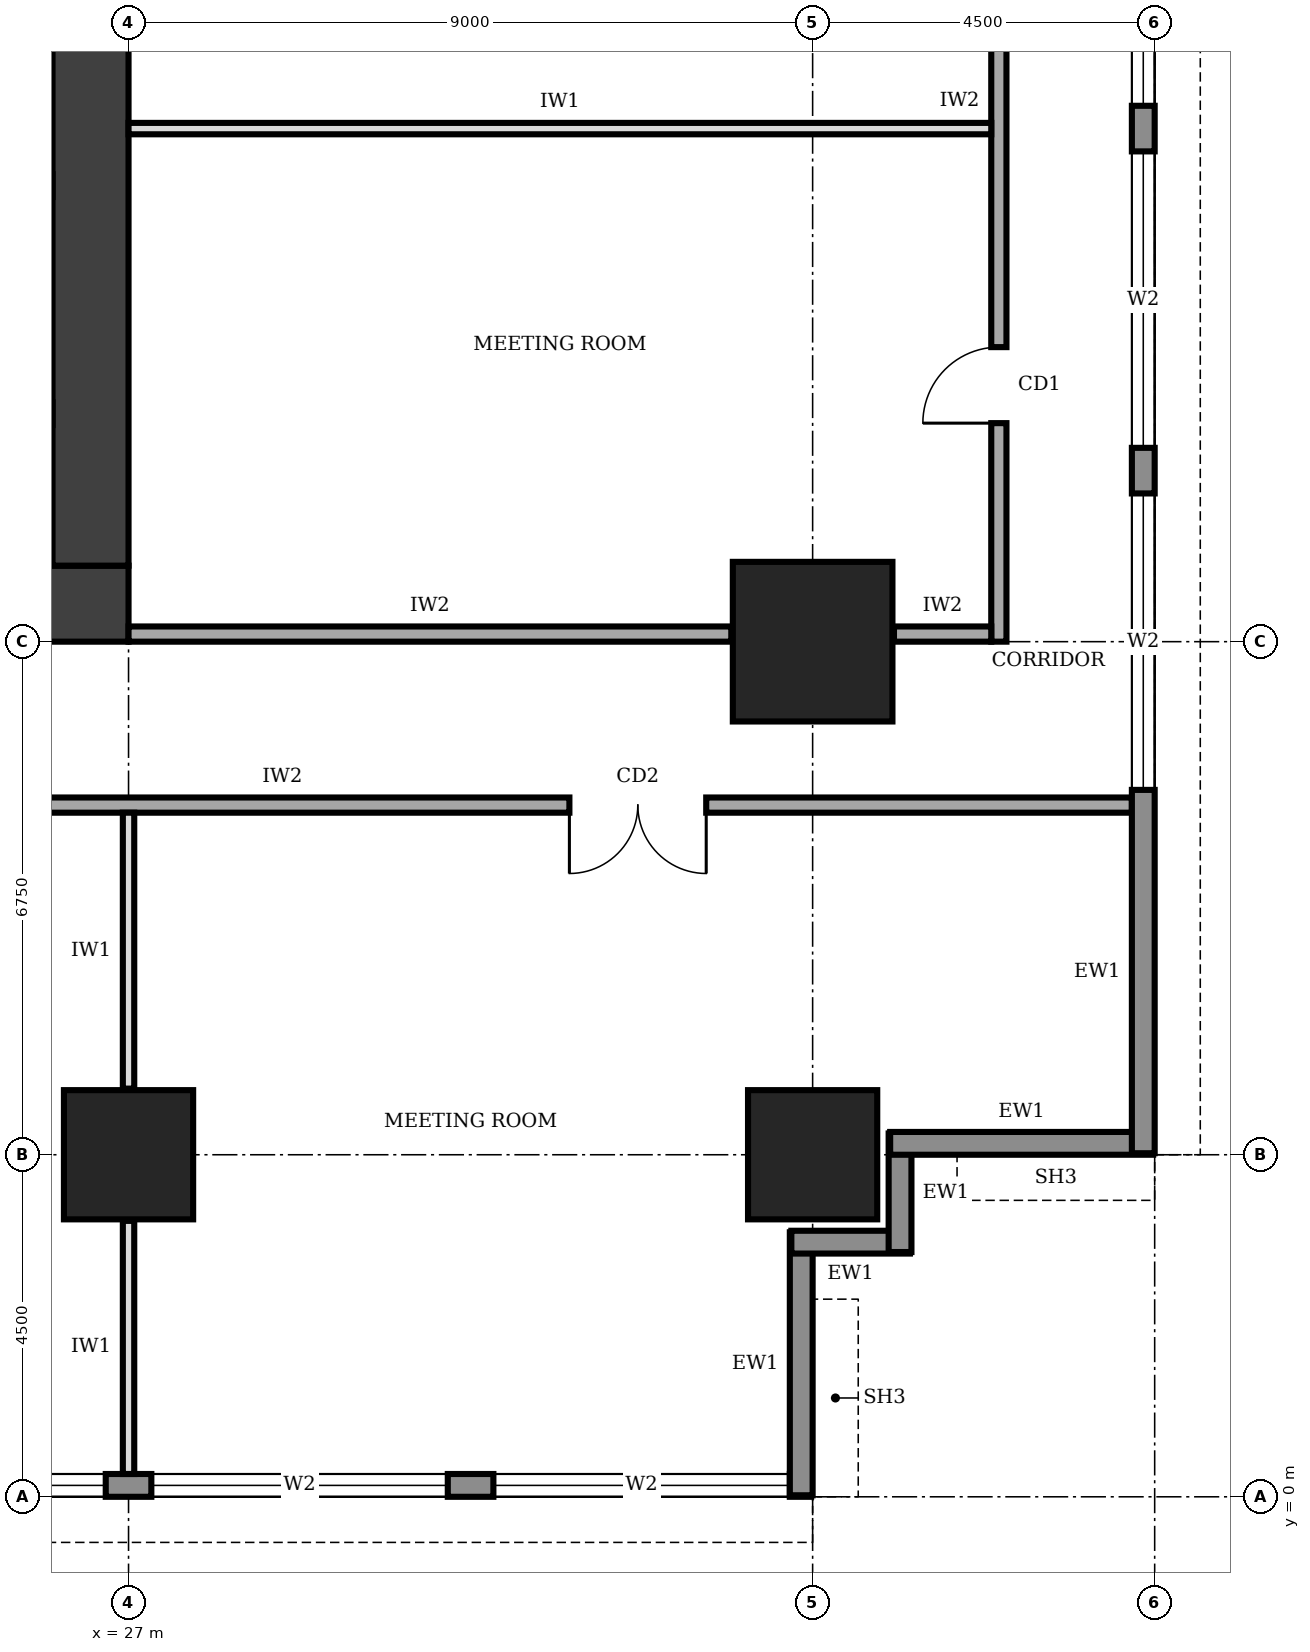
"""IFC4 building model, lengths in metres.
Left out: names, types, materials, properties, quantities, classifications, styles, units other than length and angle.
Written with IfcOpenShell. Run it as: python <this file> out.ifc"""

import sys

from ifc_helpers import new_model, si_unit, direction, frame, frame_2d, origin, origin_2d, place, context, subcontext, project, spatial, rectangle, extrude, element, fill, save


model = new_model("IFC4")
c1 = context("Model", 3, precision=1e-05, world=origin(), true_north=direction((0.0, 1.0)))
c2 = subcontext(c1, "Body", "Model", "MODEL_VIEW")
j1 = project(units=[si_unit("LENGTHUNIT", "METRE"), si_unit("PLANEANGLEUNIT", "RADIAN")], contexts=[c1])
p1 = place(None, origin())
s1 = spatial("IfcSite", under=j1, at=p1, CompositionType="ELEMENT")
p2 = place(p1, origin())
s2 = spatial("IfcBuilding", under=s1, at=p2, CompositionType="ELEMENT")
p3 = place(p2, frame((0.0, 0.0, 145.0)))
s3 = spatial("IfcBuildingStorey", under=s2, at=p3, CompositionType="ELEMENT", Elevation=145.0)
p4 = place(p3, frame((13.5, 11.75, 0.0), z_axis=(0.0, 0.0, 1.0), x_axis=(1.0, 0.0, 0.0)))
e1 = element("IfcWall", 1, at=p4, inside=s3, PredefinedType="SHEAR", context=c2, shape_type="SweptSolid", body=[
    extrude(rectangle(XDim=13.5, YDim=1.0, at=frame_2d((6.75, 0.0))), origin(), (0.0, 0.0, 1.0), 4.0),
])
p5 = place(p4, frame((4.75, 0.0, 0.0)))
e2 = element("IfcOpeningElement", 2, at=p5, cuts=e1, PredefinedType="OPENING", context=c2, shape_type="SweptSolid", body=[
    extrude(rectangle(XDim=1.0, YDim=2.1, at=frame_2d((0.5, 1.05))), frame((0.0, 0.51, 0.0), z_axis=(0.0, -1.0, 0.0), x_axis=(1.0, 0.0, 0.0)), (0.0, 0.0, 1.0), 1.02),
])
p6 = place(p3, frame((26.5, 12.25, 0.0), z_axis=(0.0, 0.0, 1.0), x_axis=(0.0, 1.0, 0.0)))
e3 = element("IfcWall", 3, at=p6, inside=s3, PredefinedType="SHEAR", context=c2, shape_type="SweptSolid", body=[
    extrude(rectangle(XDim=16.0, YDim=1.0, at=frame_2d((8.0, 0.0))), origin(), (0.0, 0.0, 1.0), 4.0),
])
for number, where, z_axis, x_axis in (
    (4, (27.0, 4.5, 0.0), (0.0, 0.0, 1.0), (1.0, 0.0, 0.0)),
    (5, (36.0, 4.5, 0.0), (0.0, 0.0, 1.0), (1.0, 0.0, 0.0)),
):
    element("IfcColumn", number, at=place(p3, frame(where, z_axis=z_axis, x_axis=x_axis)), inside=s3, PredefinedType="COLUMN", context=c2, shape_type="SweptSolid", body=[
        extrude(rectangle(XDim=1.7, YDim=1.7, at=origin_2d()), origin(), (0.0, 0.0, 1.0), 4.0),
    ])
p7 = place(p3, frame((36.0, 11.25, 0.0), z_axis=(0.0, 0.0, 1.0), x_axis=(1.0, 0.0, 0.0)))
e6 = element("IfcColumn", 6, at=p7, inside=s3, PredefinedType="COLUMN", context=c2, shape_type="SweptSolid", body=[
    extrude(rectangle(XDim=2.1, YDim=2.1, at=origin_2d()), origin(), (0.0, 0.0, 1.0), 4.0),
])
p8 = place(p3, frame((4.52, 0.15, 0.0), z_axis=(0.0, 0.0, 1.0), x_axis=(1.0, 0.0, 0.0)))
e7 = element("IfcWall", 7, at=p8, inside=s3, PredefinedType="STANDARD", context=c2, shape_type="SweptSolid", body=[
    extrude(rectangle(XDim=31.46, YDim=0.3, at=frame_2d((15.73, 0.0))), origin(), (0.0, 0.0, 1.0), 3.75),
])
p9 = place(p8, frame((4.78, 0.0, 0.6)))
e8 = element("IfcOpeningElement", 8, at=p9, cuts=e7, PredefinedType="OPENING", context=c2, shape_type="SweptSolid", body=[
    extrude(rectangle(XDim=3.9, YDim=2.6, at=frame_2d((1.95, 1.3))), frame((0.0, 0.16, 0.0), z_axis=(0.0, -1.0, 0.0), x_axis=(1.0, 0.0, 0.0)), (0.0, 0.0, 1.0), 0.32),
])
p10 = place(p8, frame((9.28, 0.0, 0.6)))
e9 = element("IfcOpeningElement", 9, at=p10, cuts=e7, PredefinedType="OPENING", context=c2, shape_type="SweptSolid", body=[
    extrude(rectangle(XDim=3.9, YDim=2.6, at=frame_2d((1.95, 1.3))), frame((0.0, 0.16, 0.0), z_axis=(0.0, -1.0, 0.0), x_axis=(1.0, 0.0, 0.0)), (0.0, 0.0, 1.0), 0.32),
])
p11 = place(p8, frame((13.78, 0.0, 0.6)))
e10 = element("IfcOpeningElement", 10, at=p11, cuts=e7, PredefinedType="OPENING", context=c2, shape_type="SweptSolid", body=[
    extrude(rectangle(XDim=3.9, YDim=2.6, at=frame_2d((1.95, 1.3))), frame((0.0, 0.16, 0.0), z_axis=(0.0, -1.0, 0.0), x_axis=(1.0, 0.0, 0.0)), (0.0, 0.0, 1.0), 0.32),
])
p12 = place(p8, frame((18.28, 0.0, 0.6)))
e11 = element("IfcOpeningElement", 11, at=p12, cuts=e7, PredefinedType="OPENING", context=c2, shape_type="SweptSolid", body=[
    extrude(rectangle(XDim=3.9, YDim=2.6, at=frame_2d((1.95, 1.3))), frame((0.0, 0.16, 0.0), z_axis=(0.0, -1.0, 0.0), x_axis=(1.0, 0.0, 0.0)), (0.0, 0.0, 1.0), 0.32),
])
p13 = place(p8, frame((22.78, 0.0, 0.6)))
e12 = element("IfcOpeningElement", 12, at=p13, cuts=e7, PredefinedType="OPENING", context=c2, shape_type="SweptSolid", body=[
    extrude(rectangle(XDim=3.9, YDim=2.6, at=frame_2d((1.95, 1.3))), frame((0.0, 0.16, 0.0), z_axis=(0.0, -1.0, 0.0), x_axis=(1.0, 0.0, 0.0)), (0.0, 0.0, 1.0), 0.32),
])
p14 = place(p8, frame((27.28, 0.0, 0.6)))
e13 = element("IfcOpeningElement", 13, at=p14, cuts=e7, PredefinedType="OPENING", context=c2, shape_type="SweptSolid", body=[
    extrude(rectangle(XDim=3.9, YDim=2.6, at=frame_2d((1.95, 1.3))), frame((0.0, 0.16, 0.0), z_axis=(0.0, -1.0, 0.0), x_axis=(1.0, 0.0, 0.0)), (0.0, 0.0, 1.0), 0.32),
])
p15 = place(p3, frame((35.85, 0.02, 0.0), z_axis=(0.0, 0.0, 1.0), x_axis=(0.0, 1.0, 0.0)))
e14 = element("IfcWall", 14, at=p15, inside=s3, PredefinedType="STANDARD", context=c2, shape_type="SweptSolid", body=[
    extrude(rectangle(XDim=3.46, YDim=0.3, at=frame_2d((1.73, 0.0))), origin(), (0.0, 0.0, 1.0), 2.85),
])
for number, where, z_axis, x_axis in (
    (15, (35.72, 3.35, 0.0), (0.0, 0.0, 1.0), (1.0, 0.0, 0.0)),
    (16, (37.15, 3.22, 0.0), (0.0, 0.0, 1.0), (0.0, 1.0, 0.0)),
):
    element("IfcWall", number, at=place(p3, frame(where, z_axis=z_axis, x_axis=x_axis)), inside=s3, PredefinedType="STANDARD", context=c2, shape_type="SweptSolid", body=[
        extrude(rectangle(XDim=1.56, YDim=0.3, at=frame_2d((0.78, 0.0))), origin(), (0.0, 0.0, 1.0), 3.75),
    ])
p16 = place(p3, frame((37.02, 4.65, 0.0), z_axis=(0.0, 0.0, 1.0), x_axis=(1.0, 0.0, 0.0)))
e17 = element("IfcWall", 17, at=p16, inside=s3, PredefinedType="STANDARD", context=c2, shape_type="SweptSolid", body=[
    extrude(rectangle(XDim=3.46, YDim=0.3, at=frame_2d((1.73, 0.0))), origin(), (0.0, 0.0, 1.0), 2.85),
])
p17 = place(p3, frame((40.35, 4.52, 0.0), z_axis=(0.0, 0.0, 1.0), x_axis=(0.0, 1.0, 0.0)))
e18 = element("IfcWall", 18, at=p17, inside=s3, PredefinedType="STANDARD", context=c2, shape_type="SweptSolid", body=[
    extrude(rectangle(XDim=31.46, YDim=0.3, at=frame_2d((15.73, 0.0))), origin(), (0.0, 0.0, 1.0), 3.75),
])
p18 = place(p17, frame((4.78, 0.0, 0.6)))
e19 = element("IfcOpeningElement", 19, at=p18, cuts=e18, PredefinedType="OPENING", context=c2, shape_type="SweptSolid", body=[
    extrude(rectangle(XDim=3.9, YDim=2.6, at=frame_2d((1.95, 1.3))), frame((0.0, 0.16, 0.0), z_axis=(0.0, -1.0, 0.0), x_axis=(1.0, 0.0, 0.0)), (0.0, 0.0, 1.0), 0.32),
])
p19 = place(p17, frame((9.28, 0.0, 0.6)))
e20 = element("IfcOpeningElement", 20, at=p19, cuts=e18, PredefinedType="OPENING", context=c2, shape_type="SweptSolid", body=[
    extrude(rectangle(XDim=3.9, YDim=2.6, at=frame_2d((1.95, 1.3))), frame((0.0, 0.16, 0.0), z_axis=(0.0, -1.0, 0.0), x_axis=(1.0, 0.0, 0.0)), (0.0, 0.0, 1.0), 0.32),
])
p20 = place(p17, frame((13.78, 0.0, 0.6)))
e21 = element("IfcOpeningElement", 21, at=p20, cuts=e18, PredefinedType="OPENING", context=c2, shape_type="SweptSolid", body=[
    extrude(rectangle(XDim=3.9, YDim=2.6, at=frame_2d((1.95, 1.3))), frame((0.0, 0.16, 0.0), z_axis=(0.0, -1.0, 0.0), x_axis=(1.0, 0.0, 0.0)), (0.0, 0.0, 1.0), 0.32),
])
p21 = place(p17, frame((18.28, 0.0, 0.6)))
e22 = element("IfcOpeningElement", 22, at=p21, cuts=e18, PredefinedType="OPENING", context=c2, shape_type="SweptSolid", body=[
    extrude(rectangle(XDim=3.9, YDim=2.6, at=frame_2d((1.95, 1.3))), frame((0.0, 0.16, 0.0), z_axis=(0.0, -1.0, 0.0), x_axis=(1.0, 0.0, 0.0)), (0.0, 0.0, 1.0), 0.32),
])
p22 = place(p17, frame((22.78, 0.0, 0.6)))
e23 = element("IfcOpeningElement", 23, at=p22, cuts=e18, PredefinedType="OPENING", context=c2, shape_type="SweptSolid", body=[
    extrude(rectangle(XDim=3.9, YDim=2.6, at=frame_2d((1.95, 1.3))), frame((0.0, 0.16, 0.0), z_axis=(0.0, -1.0, 0.0), x_axis=(1.0, 0.0, 0.0)), (0.0, 0.0, 1.0), 0.32),
])
p23 = place(p17, frame((27.28, 0.0, 0.6)))
e24 = element("IfcOpeningElement", 24, at=p23, cuts=e18, PredefinedType="OPENING", context=c2, shape_type="SweptSolid", body=[
    extrude(rectangle(XDim=3.9, YDim=2.6, at=frame_2d((1.95, 1.3))), frame((0.0, 0.16, 0.0), z_axis=(0.0, -1.0, 0.0), x_axis=(1.0, 0.0, 0.0)), (0.0, 0.0, 1.0), 0.32),
])
p24 = place(p3, frame((11.9, 9.1, 0.0), z_axis=(0.0, 0.0, 1.0), x_axis=(1.0, 0.0, 0.0)))
e25 = element("IfcWall", 25, at=p24, inside=s3, PredefinedType="SOLIDWALL", context=c2, shape_type="SweptSolid", body=[
    extrude(rectangle(XDim=28.3, YDim=0.2, at=frame_2d((14.15, 0.0))), origin(), (0.0, 0.0, 1.0), 3.75),
])
p25 = place(p24, frame((0.275, 0.0, 0.0)))
e26 = element("IfcOpeningElement", 26, at=p25, cuts=e25, PredefinedType="OPENING", context=c2, shape_type="SweptSolid", body=[
    extrude(rectangle(XDim=1.0, YDim=2.1, at=frame_2d((0.5, 1.05))), frame((0.0, 0.11, 0.0), z_axis=(0.0, -1.0, 0.0), x_axis=(1.0, 0.0, 0.0)), (0.0, 0.0, 1.0), 0.22),
])
p26 = place(p24, frame((5.6, 0.0, 0.0)))
e27 = element("IfcOpeningElement", 27, at=p26, cuts=e25, PredefinedType="OPENING", context=c2, shape_type="SweptSolid", body=[
    extrude(rectangle(XDim=1.0, YDim=2.1, at=frame_2d((0.5, 1.05))), frame((0.0, 0.11, 0.0), z_axis=(0.0, -1.0, 0.0), x_axis=(1.0, 0.0, 0.0)), (0.0, 0.0, 1.0), 0.22),
])
p27 = place(p24, frame((12.35, 0.0, 0.0)))
e28 = element("IfcOpeningElement", 28, at=p27, cuts=e25, PredefinedType="OPENING", context=c2, shape_type="SweptSolid", body=[
    extrude(rectangle(XDim=1.0, YDim=2.1, at=frame_2d((0.5, 1.05))), frame((0.0, 0.11, 0.0), z_axis=(0.0, -1.0, 0.0), x_axis=(1.0, 0.0, 0.0)), (0.0, 0.0, 1.0), 0.22),
])
p28 = place(p24, frame((20.9, 0.0, 0.0)))
e29 = element("IfcOpeningElement", 29, at=p28, cuts=e25, PredefinedType="OPENING", context=c2, shape_type="SweptSolid", body=[
    extrude(rectangle(XDim=1.8, YDim=2.1, at=frame_2d((0.9, 1.05))), frame((0.0, 0.11, 0.0), z_axis=(0.0, -1.0, 0.0), x_axis=(1.0, 0.0, 0.0)), (0.0, 0.0, 1.0), 0.22),
])
p29 = place(p3, frame((38.45, 11.25, 0.0), z_axis=(0.0, 0.0, 1.0), x_axis=(0.0, 1.0, 0.0)))
e30 = element("IfcWall", 30, at=p29, inside=s3, PredefinedType="SOLIDWALL", context=c2, shape_type="SweptSolid", body=[
    extrude(rectangle(XDim=18.0, YDim=0.2, at=frame_2d((9.0, 0.0))), origin(), (0.0, 0.0, 1.0), 3.75),
])
p30 = place(p29, frame((2.875, 0.0, 0.0)))
e31 = element("IfcOpeningElement", 31, at=p30, cuts=e30, PredefinedType="OPENING", context=c2, shape_type="SweptSolid", body=[
    extrude(rectangle(XDim=1.0, YDim=2.1, at=frame_2d((0.5, 1.05))), frame((0.0, 0.11, 0.0), z_axis=(0.0, -1.0, 0.0), x_axis=(1.0, 0.0, 0.0)), (0.0, 0.0, 1.0), 0.22),
])
p31 = place(p29, frame((10.35, 0.0, 0.0)))
e32 = element("IfcOpeningElement", 32, at=p31, cuts=e30, PredefinedType="OPENING", context=c2, shape_type="SweptSolid", body=[
    extrude(rectangle(XDim=1.8, YDim=2.1, at=frame_2d((0.9, 1.05))), frame((0.0, 0.11, 0.0), z_axis=(0.0, -1.0, 0.0), x_axis=(1.0, 0.0, 0.0)), (0.0, 0.0, 1.0), 0.22),
])
p32 = place(p29, frame((16.375, 0.0, 0.0)))
e33 = element("IfcOpeningElement", 33, at=p32, cuts=e30, PredefinedType="OPENING", context=c2, shape_type="SweptSolid", body=[
    extrude(rectangle(XDim=1.0, YDim=2.1, at=frame_2d((0.5, 1.05))), frame((0.0, 0.11, 0.0), z_axis=(0.0, -1.0, 0.0), x_axis=(1.0, 0.0, 0.0)), (0.0, 0.0, 1.0), 0.22),
])
p33 = place(p3, frame((27.0, 11.35, 0.0), z_axis=(0.0, 0.0, 1.0), x_axis=(1.0, 0.0, 0.0)))
e34 = element("IfcWall", 34, at=p33, inside=s3, PredefinedType="SOLIDWALL", context=c2, shape_type="SweptSolid", body=[
    extrude(rectangle(XDim=7.93, YDim=0.2, at=frame_2d((3.965, 0.0))), origin(), (0.0, 0.0, 1.0), 2.85),
])
p34 = place(p3, frame((37.07, 11.35, 0.0), z_axis=(0.0, 0.0, 1.0), x_axis=(1.0, 0.0, 0.0)))
e35 = element("IfcWall", 35, at=p34, inside=s3, PredefinedType="SOLIDWALL", context=c2, shape_type="SweptSolid", body=[
    extrude(rectangle(XDim=1.28, YDim=0.2, at=frame_2d((0.64, 0.0))), origin(), (0.0, 0.0, 1.0), 2.85),
])
p35 = place(p3, frame((27.0, 0.3, 0.0), z_axis=(0.0, 0.0, 1.0), x_axis=(0.0, 1.0, 0.0)))
e36 = element("IfcWall", 36, at=p35, inside=s3, PredefinedType="PARTITIONING", context=c2, shape_type="SweptSolid", body=[
    extrude(rectangle(XDim=3.33, YDim=0.15, at=frame_2d((1.665, 0.0))), origin(), (0.0, 0.0, 1.0), 2.85),
])
p36 = place(p3, frame((27.0, 5.37, 0.0), z_axis=(0.0, 0.0, 1.0), x_axis=(0.0, 1.0, 0.0)))
e37 = element("IfcWall", 37, at=p36, inside=s3, PredefinedType="PARTITIONING", context=c2, shape_type="SweptSolid", body=[
    extrude(rectangle(XDim=3.63, YDim=0.15, at=frame_2d((1.815, 0.0))), origin(), (0.0, 0.0, 1.0), 2.85),
])
p37 = place(p3, frame((27.0, 18.0, 0.0), z_axis=(0.0, 0.0, 1.0), x_axis=(1.0, 0.0, 0.0)))
e38 = element("IfcWall", 38, at=p37, inside=s3, PredefinedType="PARTITIONING", context=c2, shape_type="SweptSolid", body=[
    extrude(rectangle(XDim=11.35, YDim=0.15, at=frame_2d((5.675, 0.0))), origin(), (0.0, 0.0, 1.0), 3.75),
])
p38 = place(p12, origin())
e39 = element("IfcWindow", 39, at=p38, inside=s3, PartitioningType="SINGLE_PANEL", PredefinedType="WINDOW", context=c2, shape_type="SweptSolid", body=[
    extrude(rectangle(XDim=3.9, YDim=2.6, at=frame_2d((1.95, 1.3))), frame((0.0, 0.03, 0.0), z_axis=(0.0, -1.0, 0.0), x_axis=(1.0, 0.0, 0.0)), (0.0, 0.0, 1.0), 0.06),
])
fill(e11, e39)
p39 = place(p13, origin())
e40 = element("IfcWindow", 40, at=p39, inside=s3, PartitioningType="SINGLE_PANEL", PredefinedType="WINDOW", context=c2, shape_type="SweptSolid", body=[
    extrude(rectangle(XDim=3.9, YDim=2.6, at=frame_2d((1.95, 1.3))), frame((0.0, 0.03, 0.0), z_axis=(0.0, -1.0, 0.0), x_axis=(1.0, 0.0, 0.0)), (0.0, 0.0, 1.0), 0.06),
])
fill(e12, e40)
p40 = place(p14, origin())
e41 = element("IfcWindow", 41, at=p40, inside=s3, PartitioningType="SINGLE_PANEL", PredefinedType="WINDOW", context=c2, shape_type="SweptSolid", body=[
    extrude(rectangle(XDim=3.9, YDim=2.6, at=frame_2d((1.95, 1.3))), frame((0.0, 0.03, 0.0), z_axis=(0.0, -1.0, 0.0), x_axis=(1.0, 0.0, 0.0)), (0.0, 0.0, 1.0), 0.06),
])
fill(e13, e41)
p41 = place(p18, origin())
e42 = element("IfcWindow", 42, at=p41, inside=s3, PartitioningType="SINGLE_PANEL", PredefinedType="WINDOW", context=c2, shape_type="SweptSolid", body=[
    extrude(rectangle(XDim=3.9, YDim=2.6, at=frame_2d((1.95, 1.3))), frame((0.0, 0.03, 0.0), z_axis=(0.0, -1.0, 0.0), x_axis=(1.0, 0.0, 0.0)), (0.0, 0.0, 1.0), 0.06),
])
fill(e19, e42)
p42 = place(p19, origin())
e43 = element("IfcWindow", 43, at=p42, inside=s3, PartitioningType="SINGLE_PANEL", PredefinedType="WINDOW", context=c2, shape_type="SweptSolid", body=[
    extrude(rectangle(XDim=3.9, YDim=2.6, at=frame_2d((1.95, 1.3))), frame((0.0, 0.03, 0.0), z_axis=(0.0, -1.0, 0.0), x_axis=(1.0, 0.0, 0.0)), (0.0, 0.0, 1.0), 0.06),
])
fill(e20, e43)
p43 = place(p20, origin())
e44 = element("IfcWindow", 44, at=p43, inside=s3, PartitioningType="SINGLE_PANEL", PredefinedType="WINDOW", context=c2, shape_type="SweptSolid", body=[
    extrude(rectangle(XDim=3.9, YDim=2.6, at=frame_2d((1.95, 1.3))), frame((0.0, 0.03, 0.0), z_axis=(0.0, -1.0, 0.0), x_axis=(1.0, 0.0, 0.0)), (0.0, 0.0, 1.0), 0.06),
])
fill(e21, e44)
p44 = place(p28, frame((1.8, 0.0, 0.0), z_axis=(0.0, 0.0, 1.0), x_axis=(-1.0, 0.0, 0.0)))
e45 = element("IfcDoor", 45, at=p44, inside=s3, OperationType="DOUBLE_DOOR_SINGLE_SWING", PredefinedType="DOOR", context=c2, shape_type="SweptSolid", body=[
    extrude(rectangle(XDim=1.8, YDim=2.1, at=frame_2d((0.9, 1.05))), frame((0.0, 0.025, 0.0), z_axis=(0.0, -1.0, 0.0), x_axis=(1.0, 0.0, 0.0)), (0.0, 0.0, 1.0), 0.05),
])
fill(e29, e45)
p45 = place(p30, origin())
e46 = element("IfcDoor", 46, at=p45, inside=s3, OperationType="SINGLE_SWING_LEFT", PredefinedType="DOOR", context=c2, shape_type="SweptSolid", body=[
    extrude(rectangle(XDim=1.0, YDim=2.1, at=frame_2d((0.5, 1.05))), frame((0.0, 0.025, 0.0), z_axis=(0.0, -1.0, 0.0), x_axis=(1.0, 0.0, 0.0)), (0.0, 0.0, 1.0), 0.05),
])
fill(e31, e46)
save(model, sys.argv[1])
